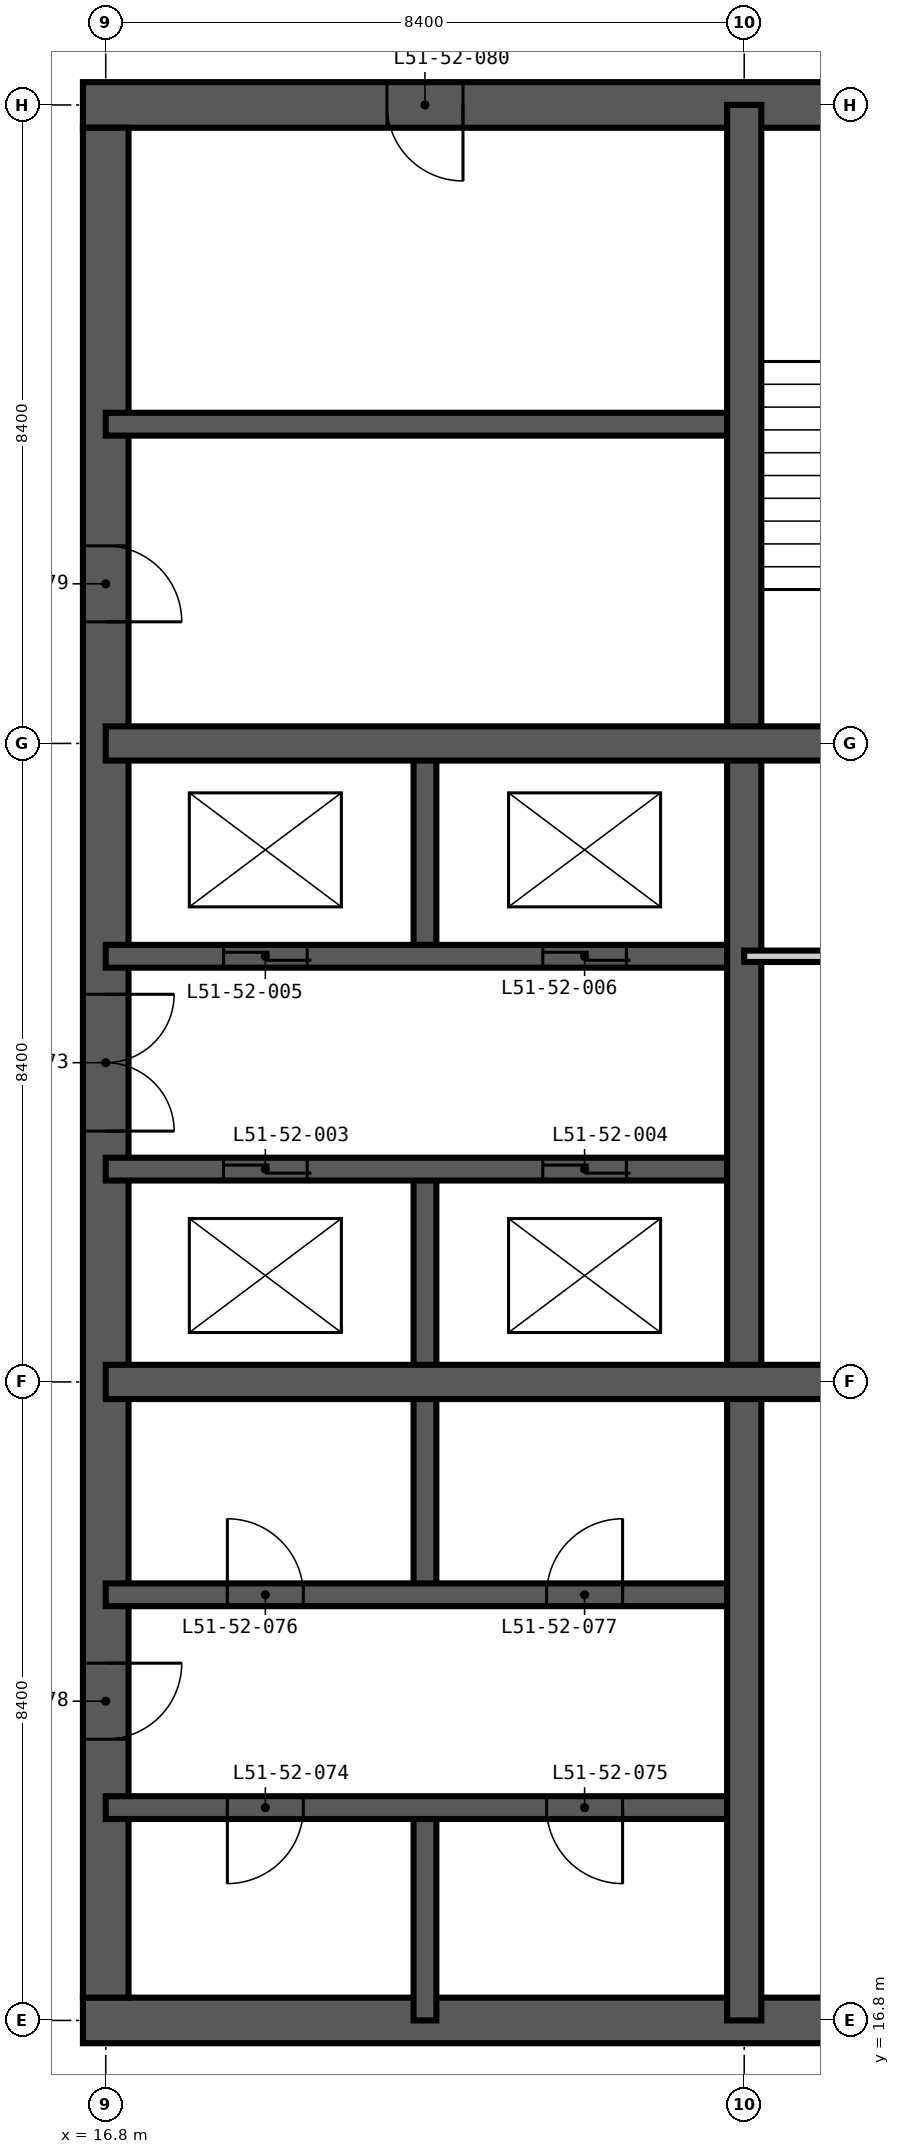
"""IFC4 building model, lengths in metres.
Left out: names, types, materials, properties, quantities, classifications, styles, units other than length and angle.
Written with IfcOpenShell. Run it as: python <this file> out.ifc"""

import sys

from ifc_helpers import new_model, si_unit, direction, frame, frame_2d, origin, place, context, subcontext, project, spatial, rectangle, extrude, element, fill, save


model = new_model("IFC4")
c1 = context("Model", 3, precision=1e-05, world=origin(), true_north=direction((0.0, 1.0)))
c2 = subcontext(c1, "Body", "Model", "MODEL_VIEW")
j1 = project(units=[si_unit("LENGTHUNIT", "METRE"), si_unit("PLANEANGLEUNIT", "RADIAN")], contexts=[c1])
p1 = place(None, origin())
s1 = spatial("IfcSite", under=j1, at=p1, CompositionType="ELEMENT")
p2 = place(p1, origin())
s2 = spatial("IfcBuilding", under=s1, at=p2, CompositionType="ELEMENT")
p3 = place(p2, frame((0.0, 0.0, 198.6)))
s3 = spatial("IfcBuildingStorey", under=s2, at=p3, CompositionType="ELEMENT", Elevation=198.6)
p4 = place(p3, frame((16.5, 16.8, -0.35), z_axis=(0.0, 0.0, 1.0), x_axis=(1.0, 0.0, 0.0)))
e1 = element("IfcWall", 1, at=p4, inside=s3, PredefinedType="SHEAR", context=c2, shape_type="SweptSolid", body=[
    extrude(rectangle(XDim=25.8, YDim=0.6, at=frame_2d((12.9, 0.0))), origin(), (0.0, 0.0, 1.0), 3.6),
])
p5 = place(p4, frame((12.4, 0.0, 0.35)))
e2 = element("IfcOpeningElement", 2, at=p5, cuts=e1, PredefinedType="OPENING", context=c2, shape_type="SweptSolid", body=[
    extrude(rectangle(XDim=1.0, YDim=2.1, at=frame_2d((0.5, 1.05))), frame((0.0, 0.31, 0.0), z_axis=(0.0, -1.0, 0.0), x_axis=(1.0, 0.0, 0.0)), (0.0, 0.0, 1.0), 0.62),
])
p6 = place(p4, frame((18.7, 0.0, 0.35)))
e3 = element("IfcOpeningElement", 3, at=p6, cuts=e1, PredefinedType="OPENING", context=c2, shape_type="SweptSolid", body=[
    extrude(rectangle(XDim=1.0, YDim=2.1, at=frame_2d((0.5, 1.05))), frame((0.0, 0.31, 0.0), z_axis=(0.0, -1.0, 0.0), x_axis=(1.0, 0.0, 0.0)), (0.0, 0.0, 1.0), 0.62),
])
p7 = place(p3, frame((42.3, 42.0, -0.35), z_axis=(0.0, 0.0, 1.0), x_axis=(-1.0, 0.0, 0.0)))
e4 = element("IfcWall", 4, at=p7, inside=s3, PredefinedType="SHEAR", context=c2, shape_type="SweptSolid", body=[
    extrude(rectangle(XDim=25.8, YDim=0.6, at=frame_2d((12.9, 0.0))), origin(), (0.0, 0.0, 1.0), 3.6),
])
p8 = place(p7, frame((20.8, 0.0, 0.35)))
e5 = element("IfcOpeningElement", 5, at=p8, cuts=e4, PredefinedType="OPENING", context=c2, shape_type="SweptSolid", body=[
    extrude(rectangle(XDim=1.0, YDim=2.1, at=frame_2d((0.5, 1.05))), frame((0.0, 0.31, 0.0), z_axis=(0.0, -1.0, 0.0), x_axis=(1.0, 0.0, 0.0)), (0.0, 0.0, 1.0), 0.62),
])
p9 = place(p7, frame((10.2, 0.0, 0.35)))
e6 = element("IfcOpeningElement", 6, at=p9, cuts=e4, PredefinedType="OPENING", context=c2, shape_type="SweptSolid", body=[
    extrude(rectangle(XDim=1.2, YDim=2.2, at=frame_2d((0.6, 1.1))), frame((0.0, 0.31, 0.0), z_axis=(0.0, -1.0, 0.0), x_axis=(1.0, 0.0, 0.0)), (0.0, 0.0, 1.0), 0.62),
])
p10 = place(p3, frame((16.8, 41.7, -0.35), z_axis=(0.0, 0.0, 1.0), x_axis=(0.0, -1.0, 0.0)))
e7 = element("IfcWall", 7, at=p10, inside=s3, PredefinedType="SHEAR", context=c2, shape_type="SweptSolid", body=[
    extrude(rectangle(XDim=24.6, YDim=0.6, at=frame_2d((12.3, 0.0))), origin(), (0.0, 0.0, 1.0), 3.6),
])
p11 = place(p10, frame((11.4, 0.0, 0.35)))
e8 = element("IfcOpeningElement", 8, at=p11, cuts=e7, PredefinedType="OPENING", context=c2, shape_type="SweptSolid", body=[
    extrude(rectangle(XDim=1.8, YDim=2.2, at=frame_2d((0.9, 1.1))), frame((0.0, 0.31, 0.0), z_axis=(0.0, -1.0, 0.0), x_axis=(1.0, 0.0, 0.0)), (0.0, 0.0, 1.0), 0.62),
])
p12 = place(p10, frame((20.2, 0.0, 0.35)))
e9 = element("IfcOpeningElement", 9, at=p12, cuts=e7, PredefinedType="OPENING", context=c2, shape_type="SweptSolid", body=[
    extrude(rectangle(XDim=1.0, YDim=2.1, at=frame_2d((0.5, 1.05))), frame((0.0, 0.31, 0.0), z_axis=(0.0, -1.0, 0.0), x_axis=(1.0, 0.0, 0.0)), (0.0, 0.0, 1.0), 0.62),
])
p13 = place(p10, frame((5.5, 0.0, 0.35)))
e10 = element("IfcOpeningElement", 10, at=p13, cuts=e7, PredefinedType="OPENING", context=c2, shape_type="SweptSolid", body=[
    extrude(rectangle(XDim=1.0, YDim=2.1, at=frame_2d((0.5, 1.05))), frame((0.0, 0.31, 0.0), z_axis=(0.0, -1.0, 0.0), x_axis=(1.0, 0.0, 0.0)), (0.0, 0.0, 1.0), 0.62),
])
p14 = place(p3, frame((21.0, 16.8, -0.35), z_axis=(0.0, 0.0, 1.0), x_axis=(0.0, 1.0, 0.0)))
e11 = element("IfcWall", 11, at=p14, inside=s3, PredefinedType="SHEAR", context=c2, shape_type="SweptSolid", body=[
    extrude(rectangle(XDim=2.8, YDim=0.3, at=frame_2d((1.4, 0.0))), origin(), (0.0, 0.0, 1.0), 3.6),
])
p15 = place(p3, frame((21.0, 22.4, -0.35), z_axis=(0.0, 0.0, 1.0), x_axis=(0.0, 1.0, 0.0)))
e12 = element("IfcWall", 12, at=p15, inside=s3, PredefinedType="SHEAR", context=c2, shape_type="SweptSolid", body=[
    extrude(rectangle(XDim=5.6, YDim=0.3, at=frame_2d((2.8, 0.0))), origin(), (0.0, 0.0, 1.0), 3.6),
])
p16 = place(p3, frame((21.0, 30.8, -0.35), z_axis=(0.0, 0.0, 1.0), x_axis=(0.0, 1.0, 0.0)))
e13 = element("IfcWall", 13, at=p16, inside=s3, PredefinedType="SHEAR", context=c2, shape_type="SweptSolid", body=[
    extrude(rectangle(XDim=2.8, YDim=0.3, at=frame_2d((1.4, 0.0))), origin(), (0.0, 0.0, 1.0), 3.6),
])
p17 = place(p3, frame((16.8, 19.6, -0.35), z_axis=(0.0, 0.0, 1.0), x_axis=(1.0, 0.0, 0.0)))
e14 = element("IfcWall", 14, at=p17, inside=s3, PredefinedType="SHEAR", context=c2, shape_type="SweptSolid", body=[
    extrude(rectangle(XDim=8.4, YDim=0.3, at=frame_2d((4.2, 0.0))), origin(), (0.0, 0.0, 1.0), 3.6),
])
p18 = place(p17, frame((1.6, 0.0, 0.35)))
e15 = element("IfcOpeningElement", 15, at=p18, cuts=e14, PredefinedType="OPENING", context=c2, shape_type="SweptSolid", body=[
    extrude(rectangle(XDim=1.0, YDim=2.1, at=frame_2d((0.5, 1.05))), frame((0.0, 0.16, 0.0), z_axis=(0.0, -1.0, 0.0), x_axis=(1.0, 0.0, 0.0)), (0.0, 0.0, 1.0), 0.32),
])
p19 = place(p17, frame((5.8, 0.0, 0.35)))
e16 = element("IfcOpeningElement", 16, at=p19, cuts=e14, PredefinedType="OPENING", context=c2, shape_type="SweptSolid", body=[
    extrude(rectangle(XDim=1.0, YDim=2.1, at=frame_2d((0.5, 1.05))), frame((0.0, 0.16, 0.0), z_axis=(0.0, -1.0, 0.0), x_axis=(1.0, 0.0, 0.0)), (0.0, 0.0, 1.0), 0.32),
])
p20 = place(p3, frame((16.8, 22.4, -0.35), z_axis=(0.0, 0.0, 1.0), x_axis=(1.0, 0.0, 0.0)))
e17 = element("IfcWall", 17, at=p20, inside=s3, PredefinedType="SHEAR", context=c2, shape_type="SweptSolid", body=[
    extrude(rectangle(XDim=8.4, YDim=0.3, at=frame_2d((4.2, 0.0))), origin(), (0.0, 0.0, 1.0), 3.6),
])
p21 = place(p20, frame((1.6, 0.0, 0.35)))
e18 = element("IfcOpeningElement", 18, at=p21, cuts=e17, PredefinedType="OPENING", context=c2, shape_type="SweptSolid", body=[
    extrude(rectangle(XDim=1.0, YDim=2.1, at=frame_2d((0.5, 1.05))), frame((0.0, 0.16, 0.0), z_axis=(0.0, -1.0, 0.0), x_axis=(1.0, 0.0, 0.0)), (0.0, 0.0, 1.0), 0.32),
])
p22 = place(p20, frame((5.8, 0.0, 0.35)))
e19 = element("IfcOpeningElement", 19, at=p22, cuts=e17, PredefinedType="OPENING", context=c2, shape_type="SweptSolid", body=[
    extrude(rectangle(XDim=1.0, YDim=2.1, at=frame_2d((0.5, 1.05))), frame((0.0, 0.16, 0.0), z_axis=(0.0, -1.0, 0.0), x_axis=(1.0, 0.0, 0.0)), (0.0, 0.0, 1.0), 0.32),
])
p23 = place(p3, frame((16.8, 28.0, -0.35), z_axis=(0.0, 0.0, 1.0), x_axis=(1.0, 0.0, 0.0)))
e20 = element("IfcWall", 20, at=p23, inside=s3, PredefinedType="SHEAR", context=c2, shape_type="SweptSolid", body=[
    extrude(rectangle(XDim=8.4, YDim=0.3, at=frame_2d((4.2, 0.0))), origin(), (0.0, 0.0, 1.0), 3.6),
])
p24 = place(p23, frame((1.55, 0.0, 0.35)))
e21 = element("IfcOpeningElement", 21, at=p24, cuts=e20, PredefinedType="OPENING", context=c2, shape_type="SweptSolid", body=[
    extrude(rectangle(XDim=1.1, YDim=2.2, at=frame_2d((0.55, 1.1))), frame((0.0, 0.16, 0.0), z_axis=(0.0, -1.0, 0.0), x_axis=(1.0, 0.0, 0.0)), (0.0, 0.0, 1.0), 0.32),
])
p25 = place(p23, frame((5.75, 0.0, 0.35)))
e22 = element("IfcOpeningElement", 22, at=p25, cuts=e20, PredefinedType="OPENING", context=c2, shape_type="SweptSolid", body=[
    extrude(rectangle(XDim=1.1, YDim=2.2, at=frame_2d((0.55, 1.1))), frame((0.0, 0.16, 0.0), z_axis=(0.0, -1.0, 0.0), x_axis=(1.0, 0.0, 0.0)), (0.0, 0.0, 1.0), 0.32),
])
p26 = place(p3, frame((16.8, 30.8, -0.35), z_axis=(0.0, 0.0, 1.0), x_axis=(1.0, 0.0, 0.0)))
e23 = element("IfcWall", 23, at=p26, inside=s3, PredefinedType="SHEAR", context=c2, shape_type="SweptSolid", body=[
    extrude(rectangle(XDim=8.4, YDim=0.3, at=frame_2d((4.2, 0.0))), origin(), (0.0, 0.0, 1.0), 3.6),
])
p27 = place(p26, frame((1.55, 0.0, 0.35)))
e24 = element("IfcOpeningElement", 24, at=p27, cuts=e23, PredefinedType="OPENING", context=c2, shape_type="SweptSolid", body=[
    extrude(rectangle(XDim=1.1, YDim=2.2, at=frame_2d((0.55, 1.1))), frame((0.0, 0.16, 0.0), z_axis=(0.0, -1.0, 0.0), x_axis=(1.0, 0.0, 0.0)), (0.0, 0.0, 1.0), 0.32),
])
p28 = place(p26, frame((5.75, 0.0, 0.35)))
e25 = element("IfcOpeningElement", 25, at=p28, cuts=e23, PredefinedType="OPENING", context=c2, shape_type="SweptSolid", body=[
    extrude(rectangle(XDim=1.1, YDim=2.2, at=frame_2d((0.55, 1.1))), frame((0.0, 0.16, 0.0), z_axis=(0.0, -1.0, 0.0), x_axis=(1.0, 0.0, 0.0)), (0.0, 0.0, 1.0), 0.32),
])
p29 = place(p3, frame((16.8, 37.8, -0.35), z_axis=(0.0, 0.0, 1.0), x_axis=(1.0, 0.0, 0.0)))
e26 = element("IfcWall", 26, at=p29, inside=s3, PredefinedType="SHEAR", context=c2, shape_type="SweptSolid", body=[
    extrude(rectangle(XDim=8.4, YDim=0.3, at=frame_2d((4.2, 0.0))), origin(), (0.0, 0.0, 1.0), 3.6),
])
for number, where, z_axis, x_axis in (
    (27, (25.2, 16.8, -0.35), (0.0, 0.0, 1.0), (0.0, 1.0, 0.0)),
    (28, (16.8, 25.2, -0.35), (0.0, 0.0, 1.0), (1.0, 0.0, 0.0)),
    (29, (16.8, 33.6, -0.35), (0.0, 0.0, 1.0), (1.0, 0.0, 0.0)),
):
    element("IfcWall", number, at=place(p3, frame(where, z_axis=z_axis, x_axis=x_axis)), inside=s3, PredefinedType="SHEAR", context=c2, shape_type="SweptSolid", body=[
        extrude(rectangle(XDim=25.2, YDim=0.45, at=frame_2d((12.6, 0.0))), origin(), (0.0, 0.0, 1.0), 3.6),
    ])
p30 = place(p3, frame((25.2, 30.8, 0.0), z_axis=(0.0, 0.0, 1.0), x_axis=(1.0, 0.0, 0.0)))
e30 = element("IfcWall", 30, at=p30, inside=s3, PredefinedType="PARTITIONING", context=c2, shape_type="SweptSolid", body=[
    extrude(rectangle(XDim=8.4, YDim=0.15, at=frame_2d((4.2, 0.0))), origin(), (0.0, 0.0, 1.0), 3.25),
])
p31 = place(p30, frame((3.7, 0.0, 0.0)))
e31 = element("IfcOpeningElement", 31, at=p31, cuts=e30, PredefinedType="OPENING", context=c2, shape_type="SweptSolid", body=[
    extrude(rectangle(XDim=1.0, YDim=2.1, at=frame_2d((0.5, 1.05))), frame((0.0, 0.085, 0.0), z_axis=(0.0, -1.0, 0.0), x_axis=(1.0, 0.0, 0.0)), (0.0, 0.0, 1.0), 0.17),
])
p32 = place(p24, origin())
e32 = element("IfcDoor", 32, at=p32, inside=s3, OperationType="DOUBLE_DOOR_SLIDING", PredefinedType="DOOR", context=c2, shape_type="SweptSolid", body=[
    extrude(rectangle(XDim=1.1, YDim=2.2, at=frame_2d((0.55, 1.1))), frame((0.0, 0.025, 0.0), z_axis=(0.0, -1.0, 0.0), x_axis=(1.0, 0.0, 0.0)), (0.0, 0.0, 1.0), 0.05),
])
fill(e21, e32)
p33 = place(p25, origin())
e33 = element("IfcDoor", 33, at=p33, inside=s3, OperationType="DOUBLE_DOOR_SLIDING", PredefinedType="DOOR", context=c2, shape_type="SweptSolid", body=[
    extrude(rectangle(XDim=1.1, YDim=2.2, at=frame_2d((0.55, 1.1))), frame((0.0, 0.025, 0.0), z_axis=(0.0, -1.0, 0.0), x_axis=(1.0, 0.0, 0.0)), (0.0, 0.0, 1.0), 0.05),
])
fill(e22, e33)
p34 = place(p27, origin())
e34 = element("IfcDoor", 34, at=p34, inside=s3, OperationType="DOUBLE_DOOR_SLIDING", PredefinedType="DOOR", context=c2, shape_type="SweptSolid", body=[
    extrude(rectangle(XDim=1.1, YDim=2.2, at=frame_2d((0.55, 1.1))), frame((0.0, 0.025, 0.0), z_axis=(0.0, -1.0, 0.0), x_axis=(1.0, 0.0, 0.0)), (0.0, 0.0, 1.0), 0.05),
])
fill(e24, e34)
p35 = place(p28, origin())
e35 = element("IfcDoor", 35, at=p35, inside=s3, OperationType="DOUBLE_DOOR_SLIDING", PredefinedType="DOOR", context=c2, shape_type="SweptSolid", body=[
    extrude(rectangle(XDim=1.1, YDim=2.2, at=frame_2d((0.55, 1.1))), frame((0.0, 0.025, 0.0), z_axis=(0.0, -1.0, 0.0), x_axis=(1.0, 0.0, 0.0)), (0.0, 0.0, 1.0), 0.05),
])
fill(e25, e35)
p36 = place(p11, origin())
e36 = element("IfcDoor", 36, at=p36, inside=s3, OperationType="DOUBLE_DOOR_DOUBLE_SWING", PredefinedType="DOOR", context=c2, shape_type="SweptSolid", body=[
    extrude(rectangle(XDim=1.8, YDim=2.2, at=frame_2d((0.9, 1.1))), frame((0.0, 0.025, 0.0), z_axis=(0.0, -1.0, 0.0), x_axis=(1.0, 0.0, 0.0)), (0.0, 0.0, 1.0), 0.05),
])
fill(e8, e36)
p37 = place(p18, frame((1.0, 0.0, 0.0), z_axis=(0.0, 0.0, 1.0), x_axis=(-1.0, 0.0, 0.0)))
e37 = element("IfcDoor", 37, at=p37, inside=s3, OperationType="SINGLE_SWING_RIGHT", PredefinedType="DOOR", context=c2, shape_type="SweptSolid", body=[
    extrude(rectangle(XDim=1.0, YDim=2.1, at=frame_2d((0.5, 1.05))), frame((0.0, 0.025, 0.0), z_axis=(0.0, -1.0, 0.0), x_axis=(1.0, 0.0, 0.0)), (0.0, 0.0, 1.0), 0.05),
])
fill(e15, e37)
p38 = place(p19, frame((1.0, 0.0, 0.0), z_axis=(0.0, 0.0, 1.0), x_axis=(-1.0, 0.0, 0.0)))
e38 = element("IfcDoor", 38, at=p38, inside=s3, OperationType="SINGLE_SWING_LEFT", PredefinedType="DOOR", context=c2, shape_type="SweptSolid", body=[
    extrude(rectangle(XDim=1.0, YDim=2.1, at=frame_2d((0.5, 1.05))), frame((0.0, 0.025, 0.0), z_axis=(0.0, -1.0, 0.0), x_axis=(1.0, 0.0, 0.0)), (0.0, 0.0, 1.0), 0.05),
])
fill(e16, e38)
p39 = place(p21, origin())
e39 = element("IfcDoor", 39, at=p39, inside=s3, OperationType="SINGLE_SWING_LEFT", PredefinedType="DOOR", context=c2, shape_type="SweptSolid", body=[
    extrude(rectangle(XDim=1.0, YDim=2.1, at=frame_2d((0.5, 1.05))), frame((0.0, 0.025, 0.0), z_axis=(0.0, -1.0, 0.0), x_axis=(1.0, 0.0, 0.0)), (0.0, 0.0, 1.0), 0.05),
])
fill(e18, e39)
p40 = place(p22, origin())
e40 = element("IfcDoor", 40, at=p40, inside=s3, OperationType="SINGLE_SWING_RIGHT", PredefinedType="DOOR", context=c2, shape_type="SweptSolid", body=[
    extrude(rectangle(XDim=1.0, YDim=2.1, at=frame_2d((0.5, 1.05))), frame((0.0, 0.025, 0.0), z_axis=(0.0, -1.0, 0.0), x_axis=(1.0, 0.0, 0.0)), (0.0, 0.0, 1.0), 0.05),
])
fill(e19, e40)
p41 = place(p12, origin())
e41 = element("IfcDoor", 41, at=p41, inside=s3, OperationType="SINGLE_SWING_LEFT", PredefinedType="DOOR", context=c2, shape_type="SweptSolid", body=[
    extrude(rectangle(XDim=1.0, YDim=2.1, at=frame_2d((0.5, 1.05))), frame((0.0, 0.025, 0.0), z_axis=(0.0, -1.0, 0.0), x_axis=(1.0, 0.0, 0.0)), (0.0, 0.0, 1.0), 0.05),
])
fill(e9, e41)
p42 = place(p13, origin())
e42 = element("IfcDoor", 42, at=p42, inside=s3, OperationType="SINGLE_SWING_RIGHT", PredefinedType="DOOR", context=c2, shape_type="SweptSolid", body=[
    extrude(rectangle(XDim=1.0, YDim=2.1, at=frame_2d((0.5, 1.05))), frame((0.0, 0.025, 0.0), z_axis=(0.0, -1.0, 0.0), x_axis=(1.0, 0.0, 0.0)), (0.0, 0.0, 1.0), 0.05),
])
fill(e10, e42)
p43 = place(p8, origin())
e43 = element("IfcDoor", 43, at=p43, inside=s3, OperationType="SINGLE_SWING_LEFT", PredefinedType="DOOR", context=c2, shape_type="SweptSolid", body=[
    extrude(rectangle(XDim=1.0, YDim=2.1, at=frame_2d((0.5, 1.05))), frame((0.0, 0.025, 0.0), z_axis=(0.0, -1.0, 0.0), x_axis=(1.0, 0.0, 0.0)), (0.0, 0.0, 1.0), 0.05),
])
fill(e5, e43)
save(model, sys.argv[1])
